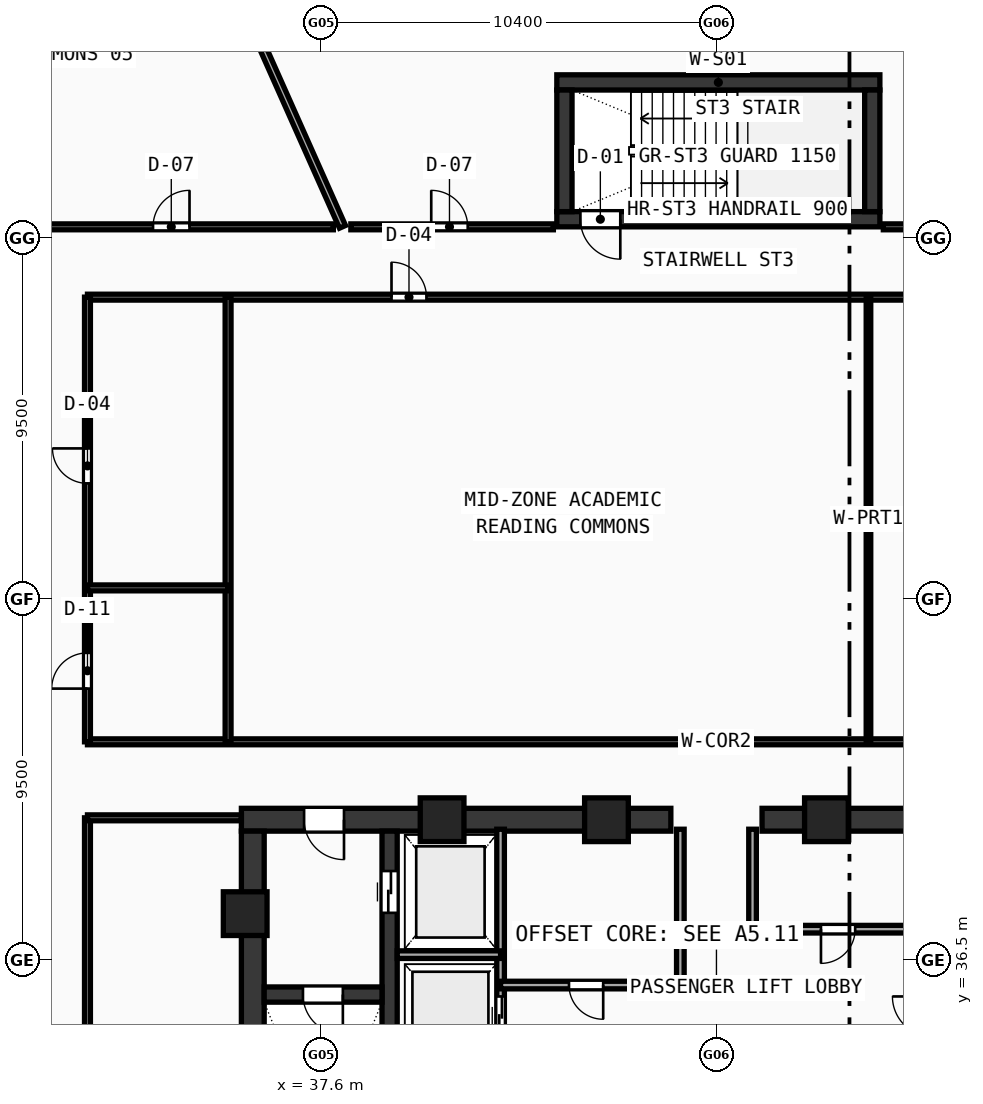
"""IFC4 building model, lengths in metres.
Left out: names, types, materials, properties, quantities, classifications, styles, units other than length and angle.
Written with IfcOpenShell. Run it as: python <this file> out.ifc"""

import sys

from ifc_helpers import new_model, si_unit, direction, frame, frame_2d, origin, origin_with_axes, origin_2d, place, context, subcontext, project, spatial, rectangle, hollow_rectangle, extrude, source, transform, mapped, element, fill, save


model = new_model("IFC4")
c1 = context("Model", 3, precision=1e-05, world=origin(), true_north=direction((0.0, 1.0)))
c2 = subcontext(c1, "Body", "Model", "MODEL_VIEW")
j1 = project(units=[si_unit("LENGTHUNIT", "METRE"), si_unit("PLANEANGLEUNIT", "RADIAN")], contexts=[c1])
p1 = place(None, origin())
s1 = spatial("IfcSite", under=j1, at=p1, CompositionType="ELEMENT")
p2 = place(p1, origin())
s2 = spatial("IfcBuilding", under=s1, at=p2, CompositionType="ELEMENT")
p3 = place(p2, frame((0.0, 0.0, 140.87)))
s3 = spatial("IfcBuildingStorey", under=s2, at=p3, CompositionType="ELEMENT", Elevation=140.87)
p4 = place(p3, frame((35.5, 40.2, 0.0), z_axis=(0.0, 0.0, 1.0), x_axis=(1.0, 0.0, 0.0)))
e1 = element("IfcWall", 1, at=p4, inside=s3, PredefinedType="SHEAR", context=c2, shape_type="SweptSolid", body=[
    extrude(rectangle(XDim=11.3, YDim=0.6, at=frame_2d((5.65, 0.0))), origin(), (0.0, 0.0, 1.0), 3.42),
])
p5 = place(p4, frame((1.65, 0.0, 0.0)))
e2 = element("IfcOpeningElement", 2, at=p5, cuts=e1, PredefinedType="OPENING", context=c2, shape_type="SweptSolid", body=[
    extrude(rectangle(XDim=1.05, YDim=2.1, at=frame_2d((0.525, 1.05))), frame((0.0, 0.31, 0.0), z_axis=(0.0, -1.0, 0.0), x_axis=(1.0, 0.0, 0.0)), (0.0, 0.0, 1.0), 0.62),
])
p6 = place(p3, frame((49.2, 40.2, 0.0), z_axis=(0.0, 0.0, 1.0), x_axis=(1.0, 0.0, 0.0)))
e3 = element("IfcWall", 3, at=p6, inside=s3, PredefinedType="SHEAR", context=c2, shape_type="SweptSolid", body=[
    extrude(rectangle(XDim=11.3, YDim=0.6, at=frame_2d((5.65, 0.0))), origin(), (0.0, 0.0, 1.0), 3.42),
])
p7 = place(p6, frame((8.6, 0.0, 0.0)))
e4 = element("IfcOpeningElement", 4, at=p7, cuts=e3, PredefinedType="OPENING", context=c2, shape_type="SweptSolid", body=[
    extrude(rectangle(XDim=1.05, YDim=2.1, at=frame_2d((0.525, 1.05))), frame((0.0, 0.31, 0.0), z_axis=(0.0, -1.0, 0.0), x_axis=(1.0, 0.0, 0.0)), (0.0, 0.0, 1.0), 0.62),
])
p8 = place(p3, frame((35.8, 27.8, 0.0), z_axis=(0.0, 0.0, 1.0), x_axis=(0.0, 1.0, 0.0)))
e5 = element("IfcWall", 5, at=p8, inside=s3, PredefinedType="SHEAR", context=c2, shape_type="SweptSolid", body=[
    extrude(rectangle(XDim=12.1, YDim=0.6, at=frame_2d((6.05, 0.0))), origin(), (0.0, 0.0, 1.0), 3.42),
])
p9 = place(p3, frame((39.4, 27.8, 0.0), z_axis=(0.0, 0.0, 1.0), x_axis=(0.0, 1.0, 0.0)))
e6 = element("IfcWall", 6, at=p9, inside=s3, PredefinedType="SHEAR", context=c2, shape_type="SweptSolid", body=[
    extrude(rectangle(XDim=12.1, YDim=0.4, at=frame_2d((6.05, 0.0))), origin(), (0.0, 0.0, 1.0), 3.42),
])
p10 = place(p9, frame((9.95, 0.0, 0.0)))
e7 = element("IfcOpeningElement", 7, at=p10, cuts=e6, PredefinedType="OPENING", context=c2, shape_type="SweptSolid", body=[
    extrude(rectangle(XDim=1.1, YDim=2.1, at=frame_2d((0.55, 1.05))), frame((0.0, 0.21, 0.0), z_axis=(0.0, -1.0, 0.0), x_axis=(1.0, 0.0, 0.0)), (0.0, 0.0, 1.0), 0.42),
])
p11 = place(p3, frame((36.1, 35.6, 0.0), z_axis=(0.0, 0.0, 1.0), x_axis=(1.0, 0.0, 0.0)))
e8 = element("IfcWall", 8, at=p11, inside=s3, PredefinedType="SHEAR", context=c2, shape_type="SweptSolid", body=[
    extrude(rectangle(XDim=3.1, YDim=0.4, at=frame_2d((1.55, 0.0))), origin(), (0.0, 0.0, 1.0), 3.42),
])
p12 = place(p11, frame((1.02, 0.0, 0.0)))
e9 = element("IfcOpeningElement", 9, at=p12, cuts=e8, PredefinedType="OPENING", context=c2, shape_type="SweptSolid", body=[
    extrude(rectangle(XDim=1.05, YDim=2.1, at=frame_2d((0.525, 1.05))), frame((0.0, 0.21, 0.0), z_axis=(0.0, -1.0, 0.0), x_axis=(1.0, 0.0, 0.0)), (0.0, 0.0, 1.0), 0.42),
])
p13 = place(p3, frame((43.8, 59.6, 0.0), z_axis=(0.0, 0.0, 1.0), x_axis=(1.0, 0.0, 0.0)))
e10 = element("IfcWall", 10, at=p13, inside=s3, PredefinedType="SHEAR", context=c2, shape_type="SweptSolid", body=[
    extrude(rectangle(XDim=8.5, YDim=0.4, at=frame_2d((4.25, 0.0))), origin(), (0.0, 0.0, 1.0), 3.42),
])
p14 = place(p3, frame((43.8, 56.0, 0.0), z_axis=(0.0, 0.0, 1.0), x_axis=(1.0, 0.0, 0.0)))
e11 = element("IfcWall", 11, at=p14, inside=s3, PredefinedType="SHEAR", context=c2, shape_type="SweptSolid", body=[
    extrude(rectangle(XDim=8.5, YDim=0.4, at=frame_2d((4.25, 0.0))), origin(), (0.0, 0.0, 1.0), 3.42),
])
p15 = place(p14, frame((0.62, 0.0, 0.0)))
e12 = element("IfcOpeningElement", 12, at=p15, cuts=e11, PredefinedType="OPENING", context=c2, shape_type="SweptSolid", body=[
    extrude(rectangle(XDim=1.05, YDim=2.1, at=frame_2d((0.525, 1.05))), frame((0.0, 0.21, 0.0), z_axis=(0.0, -1.0, 0.0), x_axis=(1.0, 0.0, 0.0)), (0.0, 0.0, 1.0), 0.42),
])
for number, where, z_axis, x_axis in (
    (13, (44.0, 56.2, 0.0), (0.0, 0.0, 1.0), (0.0, 1.0, 0.0)),
    (14, (52.1, 56.2, 0.0), (0.0, 0.0, 1.0), (0.0, 1.0, 0.0)),
):
    element("IfcWall", number, at=place(p3, frame(where, z_axis=z_axis, x_axis=x_axis)), inside=s3, PredefinedType="SHEAR", context=c2, shape_type="SweptSolid", body=[
        extrude(rectangle(XDim=3.2, YDim=0.4, at=frame_2d((1.6, 0.0))), origin(), (0.0, 0.0, 1.0), 3.42),
    ])
m1 = source(origin(), c2, "Body", "SweptSolid", [
    extrude(hollow_rectangle(XDim=1.15, YDim=1.15, WallThickness=0.048, at=origin_2d()), origin(), (0.0, 0.0, 1.0), 3.68),
])
for number, where, z_axis, x_axis in (
    (15, (50.894, 40.2, -0.26), (0.0, 0.0, 1.0), (1.0, 0.0, 0.0)),
    (16, (45.106, 40.2, -0.26), (0.0, 0.0, 1.0), (1.0, 0.0, 0.0)),
    (17, (40.781, 40.2, -0.26), (0.0, 0.0, 1.0), (1.0, 0.0, 0.0)),
    (18, (35.6, 37.729, -0.26), (0.0, 0.0, 1.0), (1.0, 0.0, 0.0)),
):
    element("IfcColumn", number, at=place(p3, frame(where, z_axis=z_axis, x_axis=x_axis)), inside=s3, PredefinedType="COLUMN", context=c2, shape_type="MappedRepresentation", body=[
        mapped(m1, transform((0.0, 0.0, 0.0), scale=1.0)),
    ])
p16 = place(p3, frame((42.32, 33.5, 0.0), z_axis=(0.0, 0.0, 1.0), x_axis=(0.0, 1.0, 0.0)))
e19 = element("IfcWall", 19, at=p16, inside=s3, PredefinedType="SOLIDWALL", context=c2, shape_type="SweptSolid", body=[
    extrude(rectangle(XDim=6.45, YDim=0.2, at=frame_2d((3.225, 0.0))), origin(), (0.0, 0.0, 1.0), 3.42),
])
p17 = place(p16, frame((1.0, 0.0, 0.0)))
e20 = element("IfcOpeningElement", 20, at=p17, cuts=e19, PredefinedType="OPENING", context=c2, shape_type="SweptSolid", body=[
    extrude(rectangle(XDim=1.05, YDim=2.1, at=frame_2d((0.525, 1.05))), frame((0.0, 0.11, 0.0), z_axis=(0.0, -1.0, 0.0), x_axis=(1.0, 0.0, 0.0)), (0.0, 0.0, 1.0), 0.22),
])
p18 = place(p3, frame((39.6, 36.65, 0.0), z_axis=(0.0, 0.0, 1.0), x_axis=(1.0, 0.0, 0.0)))
e21 = element("IfcWall", 21, at=p18, inside=s3, PredefinedType="SOLIDWALL", context=c2, shape_type="SweptSolid", body=[
    extrude(rectangle(XDim=2.72, YDim=0.2, at=frame_2d((1.36, 0.0))), origin(), (0.0, 0.0, 1.0), 3.42),
])
p19 = place(p3, frame((42.32, 35.85, 0.0), z_axis=(0.0, 0.0, 1.0), x_axis=(1.0, 0.0, 0.0)))
e22 = element("IfcWall", 22, at=p19, inside=s3, PredefinedType="SOLIDWALL", context=c2, shape_type="SweptSolid", body=[
    extrude(rectangle(XDim=4.73, YDim=0.2, at=frame_2d((2.365, 0.0))), origin(), (0.0, 0.0, 1.0), 3.42),
])
p20 = place(p19, frame((1.8, 0.0, 0.0)))
e23 = element("IfcOpeningElement", 23, at=p20, cuts=e22, PredefinedType="OPENING", context=c2, shape_type="SweptSolid", body=[
    extrude(rectangle(XDim=0.9, YDim=2.1, at=frame_2d((0.45, 1.05))), frame((0.0, 0.11, 0.0), z_axis=(0.0, -1.0, 0.0), x_axis=(1.0, 0.0, 0.0)), (0.0, 0.0, 1.0), 0.22),
])
p21 = place(p3, frame((48.95, 37.32, 0.0), z_axis=(0.0, 0.0, 1.0), x_axis=(1.0, 0.0, 0.0)))
e24 = element("IfcWall", 24, at=p21, inside=s3, PredefinedType="SOLIDWALL", context=c2, shape_type="SweptSolid", body=[
    extrude(rectangle(XDim=4.73, YDim=0.2, at=frame_2d((2.365, 0.0))), origin(), (0.0, 0.0, 1.0), 3.42),
])
p22 = place(p21, frame((1.8, 0.0, 0.0)))
e25 = element("IfcOpeningElement", 25, at=p22, cuts=e24, PredefinedType="OPENING", context=c2, shape_type="SweptSolid", body=[
    extrude(rectangle(XDim=0.9, YDim=2.1, at=frame_2d((0.45, 1.05))), frame((0.0, 0.11, 0.0), z_axis=(0.0, -1.0, 0.0), x_axis=(1.0, 0.0, 0.0)), (0.0, 0.0, 1.0), 0.22),
])
p23 = place(p3, frame((47.05, 35.85, 0.0), z_axis=(0.0, 0.0, 1.0), x_axis=(0.0, 1.0, 0.0)))
e26 = element("IfcWall", 26, at=p23, inside=s3, PredefinedType="SOLIDWALL", context=c2, shape_type="SweptSolid", body=[
    extrude(rectangle(XDim=4.1, YDim=0.2, at=frame_2d((2.05, 0.0))), origin(), (0.0, 0.0, 1.0), 3.42),
])
p24 = place(p3, frame((48.95, 37.32, 0.0), z_axis=(0.0, 0.0, 1.0), x_axis=(0.0, 1.0, 0.0)))
e27 = element("IfcWall", 27, at=p24, inside=s3, PredefinedType="SOLIDWALL", context=c2, shape_type="SweptSolid", body=[
    extrude(rectangle(XDim=2.63, YDim=0.2, at=frame_2d((1.315, 0.0))), origin(), (0.0, 0.0, 1.0), 3.42),
])
p25 = place(p3, frame((31.45, 42.25, 0.0), z_axis=(0.0, 0.0, 1.0), x_axis=(1.0, 0.0, 0.0)))
e28 = element("IfcWall", 28, at=p25, inside=s3, PredefinedType="PARTITIONING", context=c2, shape_type="SweptSolid", body=[
    extrude(rectangle(XDim=33.1, YDim=0.155, at=frame_2d((16.55, 0.0))), origin(), (0.0, 0.0, 1.0), 2.77),
])
p26 = place(p3, frame((31.45, 53.95, 0.0), z_axis=(0.0, 0.0, 1.0), x_axis=(1.0, 0.0, 0.0)))
e29 = element("IfcWall", 29, at=p26, inside=s3, PredefinedType="PARTITIONING", context=c2, shape_type="SweptSolid", body=[
    extrude(rectangle(XDim=33.1, YDim=0.155, at=frame_2d((16.55, 0.0))), origin(), (0.0, 0.0, 1.0), 2.77),
])
p27 = place(p26, frame((8.0, 0.0, 0.0)))
e30 = element("IfcOpeningElement", 30, at=p27, cuts=e29, PredefinedType="OPENING", context=c2, shape_type="SweptSolid", body=[
    extrude(rectangle(XDim=0.92, YDim=2.1, at=frame_2d((0.46, 1.05))), frame((0.0, 0.087, 0.0), z_axis=(0.0, -1.0, 0.0), x_axis=(1.0, 0.0, 0.0)), (0.0, 0.0, 1.0), 0.175),
])
p28 = place(p26, frame((25.05, 0.0, 0.0)))
e31 = element("IfcOpeningElement", 31, at=p28, cuts=e29, PredefinedType="OPENING", context=c2, shape_type="SweptSolid", body=[
    extrude(rectangle(XDim=0.92, YDim=2.1, at=frame_2d((0.46, 1.05))), frame((0.0, 0.087, 0.0), z_axis=(0.0, -1.0, 0.0), x_axis=(1.0, 0.0, 0.0)), (0.0, 0.0, 1.0), 0.175),
])
p29 = place(p3, frame((31.45, 42.25, 0.0), z_axis=(0.0, 0.0, 1.0), x_axis=(0.0, 1.0, 0.0)))
e32 = element("IfcWall", 32, at=p29, inside=s3, PredefinedType="PARTITIONING", context=c2, shape_type="SweptSolid", body=[
    extrude(rectangle(XDim=11.7, YDim=0.155, at=frame_2d((5.85, 0.0))), origin(), (0.0, 0.0, 1.0), 2.77),
])
p30 = place(p29, frame((1.4, 0.0, 0.0)))
e33 = element("IfcOpeningElement", 33, at=p30, cuts=e32, PredefinedType="OPENING", context=c2, shape_type="SweptSolid", body=[
    extrude(rectangle(XDim=0.94, YDim=2.1, at=frame_2d((0.47, 1.05))), frame((0.0, 0.087, 0.0), z_axis=(0.0, -1.0, 0.0), x_axis=(1.0, 0.0, 0.0)), (0.0, 0.0, 1.0), 0.175),
])
p31 = place(p29, frame((6.8, 0.0, 0.0)))
e34 = element("IfcOpeningElement", 34, at=p31, cuts=e32, PredefinedType="OPENING", context=c2, shape_type="SweptSolid", body=[
    extrude(rectangle(XDim=0.92, YDim=2.1, at=frame_2d((0.46, 1.05))), frame((0.0, 0.087, 0.0), z_axis=(0.0, -1.0, 0.0), x_axis=(1.0, 0.0, 0.0)), (0.0, 0.0, 1.0), 0.175),
])
p32 = place(p3, frame((35.15, 42.25, 0.0), z_axis=(0.0, 0.0, 1.0), x_axis=(0.0, 1.0, 0.0)))
e35 = element("IfcWall", 35, at=p32, inside=s3, PredefinedType="PARTITIONING", context=c2, shape_type="SweptSolid", body=[
    extrude(rectangle(XDim=11.7, YDim=0.155, at=frame_2d((5.85, 0.0))), origin(), (0.0, 0.0, 1.0), 2.77),
])
p33 = place(p3, frame((31.45, 46.3, 0.0), z_axis=(0.0, 0.0, 1.0), x_axis=(1.0, 0.0, 0.0)))
e36 = element("IfcWall", 36, at=p33, inside=s3, PredefinedType="PARTITIONING", context=c2, shape_type="SweptSolid", body=[
    extrude(rectangle(XDim=3.7, YDim=0.155, at=frame_2d((1.85, 0.0))), origin(), (0.0, 0.0, 1.0), 2.77),
])
p34 = place(p3, frame((52.0, 42.25, 0.0), z_axis=(0.0, 0.0, 1.0), x_axis=(0.0, 1.0, 0.0)))
e37 = element("IfcWall", 37, at=p34, inside=s3, PredefinedType="PARTITIONING", context=c2, shape_type="SweptSolid", body=[
    extrude(rectangle(XDim=11.7, YDim=0.12, at=frame_2d((5.85, 0.0))), origin(), (0.0, 0.0, 1.0), 2.77),
])
p35 = place(p3, frame((31.45, 23.65, 0.0), z_axis=(0.0, 0.0, 1.0), x_axis=(0.0, 1.0, 0.0)))
e38 = element("IfcWall", 38, at=p35, inside=s3, PredefinedType="PARTITIONING", context=c2, shape_type="SweptSolid", body=[
    extrude(rectangle(XDim=16.6, YDim=0.155, at=frame_2d((8.3, 0.0))), origin(), (0.0, 0.0, 1.0), 2.77),
])
p36 = place(p35, frame((7.5, 0.0, 0.0)))
e39 = element("IfcOpeningElement", 39, at=p36, cuts=e38, PredefinedType="OPENING", context=c2, shape_type="SweptSolid", body=[
    extrude(rectangle(XDim=0.9, YDim=2.08, at=frame_2d((0.45, 1.04))), frame((0.0, 0.087, 0.0), z_axis=(0.0, -1.0, 0.0), x_axis=(1.0, 0.0, 0.0)), (0.0, 0.0, 1.0), 0.175),
])
p37 = place(p3, frame((31.45, 40.25, 0.0), z_axis=(0.0, 0.0, 1.0), x_axis=(1.0, 0.0, 0.0)))
e40 = element("IfcWall", 40, at=p37, inside=s3, PredefinedType="PARTITIONING", context=c2, shape_type="SweptSolid", body=[
    extrude(rectangle(XDim=4.05, YDim=0.155, at=frame_2d((2.025, 0.0))), origin(), (0.0, 0.0, 1.0), 3.42),
])
p38 = place(p3, frame((38.16, 55.8, 0.0), z_axis=(0.0, 0.0, 1.0), x_axis=(-0.406735812773, 0.913545827317, 0.0)))
e41 = element("IfcWall", 41, at=p38, inside=s3, PredefinedType="PARTITIONING", context=c2, shape_type="SweptSolid", body=[
    extrude(rectangle(XDim=15.394, YDim=0.175, at=frame_2d((7.697, 0.0))), origin(), (0.0, 0.0, 1.0), 2.77),
])
p39 = place(p3, frame((29.6, 55.8, 0.0), z_axis=(0.0, 0.0, 1.0), x_axis=(1.0, 0.0, 0.0)))
e42 = element("IfcWall", 42, at=p39, inside=s3, PredefinedType="PARTITIONING", context=c2, shape_type="SweptSolid", body=[
    extrude(rectangle(XDim=8.32, YDim=0.155, at=frame_2d((4.16, 0.0))), origin(), (0.0, 0.0, 1.0), 3.02),
])
p40 = place(p39, frame((3.575, 0.0, 0.0)))
e43 = element("IfcOpeningElement", 43, at=p40, cuts=e42, PredefinedType="OPENING", context=c2, shape_type="SweptSolid", body=[
    extrude(rectangle(XDim=0.96, YDim=2.12, at=frame_2d((0.48, 1.06))), frame((0.0, 0.087, 0.0), z_axis=(0.0, -1.0, 0.0), x_axis=(1.0, 0.0, 0.0)), (0.0, 0.0, 1.0), 0.175),
])
p41 = place(p3, frame((38.38, 55.8, 0.0), z_axis=(0.0, 0.0, 1.0), x_axis=(1.0, 0.0, 0.0)))
e44 = element("IfcWall", 44, at=p41, inside=s3, PredefinedType="PARTITIONING", context=c2, shape_type="SweptSolid", body=[
    extrude(rectangle(XDim=5.329, YDim=0.155, at=frame_2d((2.665, 0.0))), origin(), (0.0, 0.0, 1.0), 2.77),
])
p42 = place(p41, frame((2.115, 0.0, 0.0)))
e45 = element("IfcOpeningElement", 45, at=p42, cuts=e44, PredefinedType="OPENING", context=c2, shape_type="SweptSolid", body=[
    extrude(rectangle(XDim=0.96, YDim=2.12, at=frame_2d((0.48, 1.06))), frame((0.0, 0.087, 0.0), z_axis=(0.0, -1.0, 0.0), x_axis=(1.0, 0.0, 0.0)), (0.0, 0.0, 1.0), 0.175),
])
p43 = place(p3, frame((52.391, 55.8, 0.0), z_axis=(0.0, 0.0, 1.0), x_axis=(1.0, 0.0, 0.0)))
e46 = element("IfcWall", 46, at=p43, inside=s3, PredefinedType="PARTITIONING", context=c2, shape_type="SweptSolid", body=[
    extrude(rectangle(XDim=5.229, YDim=0.155, at=frame_2d((2.614, 0.0))), origin(), (0.0, 0.0, 1.0), 2.77),
])
m2 = source(origin(), c2, "Body", "SweptSolid", [
    extrude(rectangle(XDim=1.05, YDim=2.1, at=frame_2d((0.525, 1.05))), frame((0.0, 0.025, 0.0), z_axis=(0.0, -1.0, 0.0), x_axis=(1.0, 0.0, 0.0)), (0.0, 0.0, 1.0), 0.05),
])
p44 = place(p12, frame((1.05, 0.0, 0.0), z_axis=(0.0, 0.0, 1.0), x_axis=(-1.0, 0.0, 0.0)))
e47 = element("IfcDoor", 47, at=p44, inside=s3, OperationType="SINGLE_SWING_LEFT", PredefinedType="DOOR", context=c2, shape_type="MappedRepresentation", body=[
    mapped(m2, transform((0.0, 0.0, 0.0), scale=1.0)),
])
fill(e9, e47)
p45 = place(p5, frame((1.05, 0.0, 0.0), z_axis=(0.0, 0.0, 1.0), x_axis=(-1.0, 0.0, 0.0)))
e48 = element("IfcDoor", 48, at=p45, inside=s3, OperationType="SINGLE_SWING_LEFT", PredefinedType="DOOR", context=c2, shape_type="MappedRepresentation", body=[
    mapped(m2, transform((0.0, 0.0, 0.0), scale=1.0)),
])
fill(e2, e48)
m3 = source(origin(), c2, "Body", "SweptSolid", [
    extrude(rectangle(XDim=1.1, YDim=2.1, at=frame_2d((0.55, 1.05))), frame((0.0, 0.025, 0.0), z_axis=(0.0, -1.0, 0.0), x_axis=(1.0, 0.0, 0.0)), (0.0, 0.0, 1.0), 0.05),
])
p46 = place(p10, frame((1.1, 0.0, 0.0), z_axis=(0.0, 0.0, 1.0), x_axis=(-1.0, 0.0, 0.0)))
e49 = element("IfcDoor", 49, at=p46, inside=s3, OperationType="DOUBLE_DOOR_SLIDING", PredefinedType="DOOR", context=c2, shape_type="MappedRepresentation", body=[
    mapped(m3, transform((0.0, 0.0, 0.0), scale=1.0)),
])
fill(e7, e49)
p47 = place(p17, origin_with_axes())
e50 = element("IfcDoor", 50, at=p47, inside=s3, OperationType="DOUBLE_DOOR_SLIDING", PredefinedType="DOOR", context=c2, shape_type="MappedRepresentation", body=[
    mapped(m2, transform((0.0, 0.0, 0.0), scale=1.0)),
])
fill(e20, e50)
m4 = source(origin(), c2, "Body", "SweptSolid", [
    extrude(rectangle(XDim=0.9, YDim=2.1, at=frame_2d((0.45, 1.05))), frame((0.0, 0.025, 0.0), z_axis=(0.0, -1.0, 0.0), x_axis=(1.0, 0.0, 0.0)), (0.0, 0.0, 1.0), 0.05),
])
p48 = place(p20, frame((0.9, 0.0, 0.0), z_axis=(0.0, 0.0, 1.0), x_axis=(-1.0, 0.0, 0.0)))
e51 = element("IfcDoor", 51, at=p48, inside=s3, OperationType="SINGLE_SWING_LEFT", PredefinedType="DOOR", context=c2, shape_type="MappedRepresentation", body=[
    mapped(m4, transform((0.0, 0.0, 0.0), scale=1.0)),
])
fill(e23, e51)
p49 = place(p22, frame((0.9, 0.0, 0.0), z_axis=(0.0, 0.0, 1.0), x_axis=(-1.0, 0.0, 0.0)))
e52 = element("IfcDoor", 52, at=p49, inside=s3, OperationType="SINGLE_SWING_RIGHT", PredefinedType="DOOR", context=c2, shape_type="MappedRepresentation", body=[
    mapped(m4, transform((0.0, 0.0, 0.0), scale=1.0)),
])
fill(e25, e52)
p50 = place(p15, frame((1.05, 0.0, 0.0), z_axis=(0.0, 0.0, 1.0), x_axis=(-1.0, 0.0, 0.0)))
e53 = element("IfcDoor", 53, at=p50, inside=s3, OperationType="SINGLE_SWING_LEFT", PredefinedType="DOOR", context=c2, shape_type="MappedRepresentation", body=[
    mapped(m2, transform((0.0, 0.0, 0.0), scale=1.0)),
])
fill(e12, e53)
m5 = source(origin(), c2, "Body", "SweptSolid", [
    extrude(rectangle(XDim=0.94, YDim=2.1, at=frame_2d((0.47, 1.05))), frame((0.0, 0.025, 0.0), z_axis=(0.0, -1.0, 0.0), x_axis=(1.0, 0.0, 0.0)), (0.0, 0.0, 1.0), 0.05),
])
p51 = place(p30, origin_with_axes())
e54 = element("IfcDoor", 54, at=p51, inside=s3, OperationType="SINGLE_SWING_LEFT", PredefinedType="DOOR", context=c2, shape_type="MappedRepresentation", body=[
    mapped(m5, transform((0.0, 0.0, 0.0), scale=1.0)),
])
fill(e33, e54)
m6 = source(origin(), c2, "Body", "SweptSolid", [
    extrude(rectangle(XDim=0.92, YDim=2.1, at=frame_2d((0.46, 1.05))), frame((0.0, 0.025, 0.0), z_axis=(0.0, -1.0, 0.0), x_axis=(1.0, 0.0, 0.0)), (0.0, 0.0, 1.0), 0.05),
])
p52 = place(p31, origin_with_axes())
e55 = element("IfcDoor", 55, at=p52, inside=s3, OperationType="SINGLE_SWING_RIGHT", PredefinedType="DOOR", context=c2, shape_type="MappedRepresentation", body=[
    mapped(m6, transform((0.0, 0.0, 0.0), scale=1.0)),
])
fill(e34, e55)
p53 = place(p27, origin_with_axes())
e56 = element("IfcDoor", 56, at=p53, inside=s3, OperationType="SINGLE_SWING_LEFT", PredefinedType="DOOR", context=c2, shape_type="MappedRepresentation", body=[
    mapped(m6, transform((0.0, 0.0, 0.0), scale=1.0)),
])
fill(e30, e56)
m7 = source(origin(), c2, "Body", "SweptSolid", [
    extrude(rectangle(XDim=0.96, YDim=2.12, at=frame_2d((0.48, 1.06))), frame((0.0, 0.025, 0.0), z_axis=(0.0, -1.0, 0.0), x_axis=(1.0, 0.0, 0.0)), (0.0, 0.0, 1.0), 0.05),
])
p54 = place(p42, origin_with_axes())
e57 = element("IfcDoor", 57, at=p54, inside=s3, OperationType="SINGLE_SWING_LEFT", PredefinedType="DOOR", context=c2, shape_type="MappedRepresentation", body=[
    mapped(m7, transform((0.0, 0.0, 0.0), scale=1.0)),
])
fill(e45, e57)
p55 = place(p40, origin_with_axes())
e58 = element("IfcDoor", 58, at=p55, inside=s3, OperationType="SINGLE_SWING_RIGHT", PredefinedType="DOOR", context=c2, shape_type="MappedRepresentation", body=[
    mapped(m7, transform((0.0, 0.0, 0.0), scale=1.0)),
])
fill(e43, e58)
save(model, sys.argv[1])
